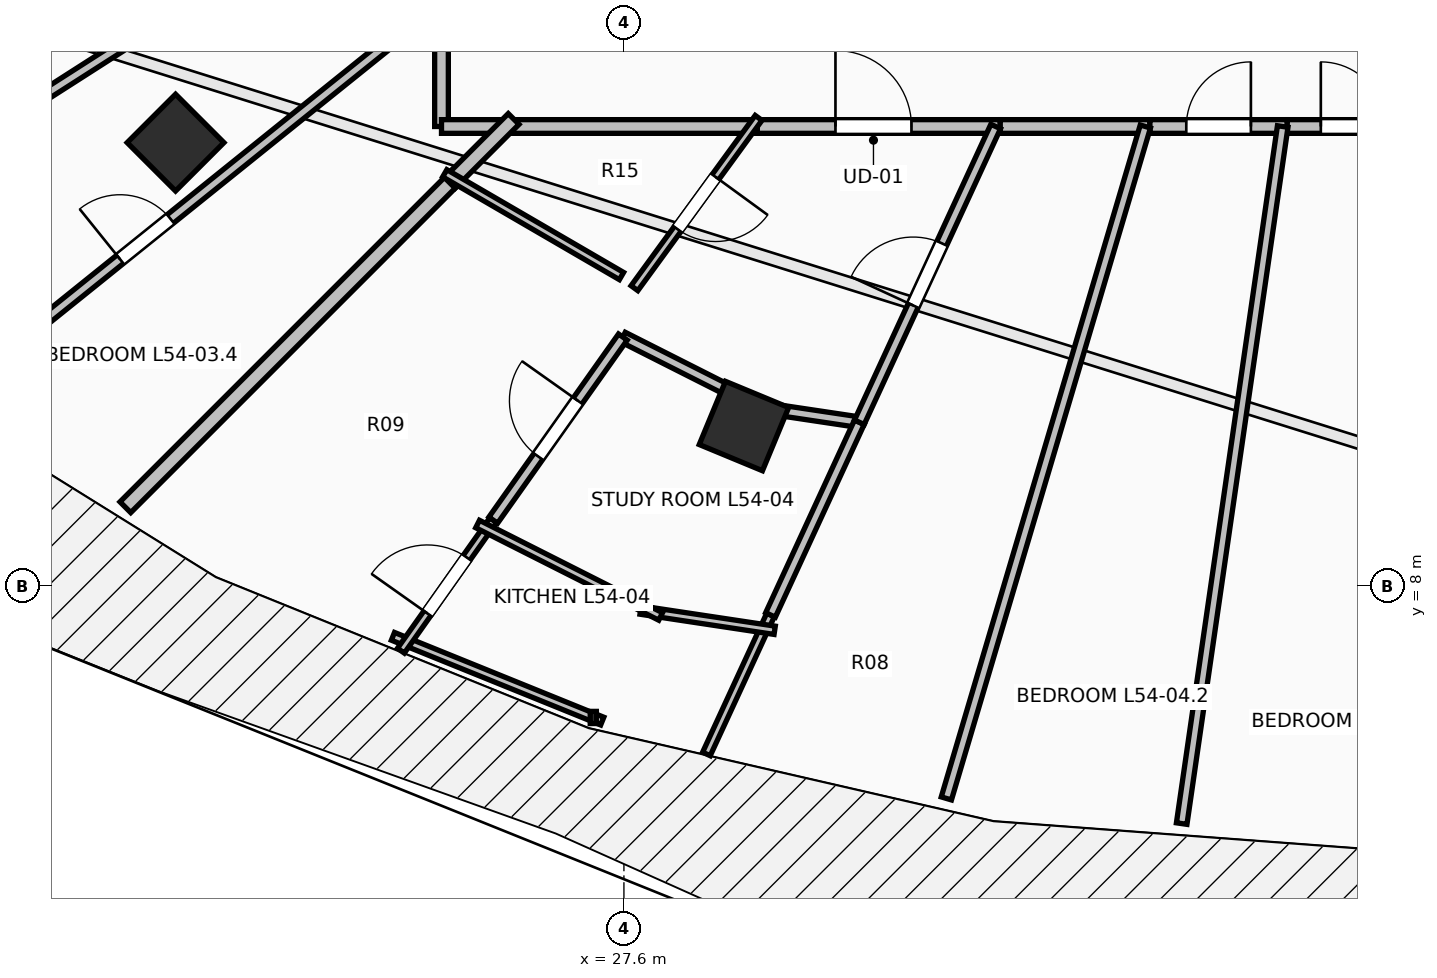
"""IFC4 building model, lengths in metres.
Left out: names, types, materials, properties, quantities, classifications, styles, units other than length and angle.
Written with IfcOpenShell. Run it as: python <this file> out.ifc"""

import sys

from ifc_helpers import new_model, si_unit, direction, frame, frame_2d, origin, origin_2d, place, context, subcontext, project, spatial, rectangle, extrude, element, fill, save


model = new_model("IFC4")
c1 = context("Model", 3, precision=1e-05, world=origin(), true_north=direction((0.0, 1.0)))
c2 = subcontext(c1, "Body", "Model", "MODEL_VIEW")
j1 = project(units=[si_unit("LENGTHUNIT", "METRE"), si_unit("PLANEANGLEUNIT", "RADIAN")], contexts=[c1])
p1 = place(None, origin())
s1 = spatial("IfcSite", under=j1, at=p1, CompositionType="ELEMENT")
p2 = place(p1, origin())
s2 = spatial("IfcBuilding", under=s1, at=p2, CompositionType="ELEMENT")
p3 = place(p2, frame((0.0, 0.0, 200.1)))
s3 = spatial("IfcBuildingStorey", under=s2, at=p3, CompositionType="ELEMENT", Elevation=200.1)
for number, where, z_axis, x_axis in (
    (1, (21.701, 13.838, 0.0), (0.0, 0.0, 1.0), (-0.707, -0.707, 0.0)),
    (2, (29.179, 10.109, 0.0), (0.0, 0.0, 1.0), (-0.383, -0.924, 0.0)),
):
    element("IfcColumn", number, at=place(p3, frame(where, z_axis=z_axis, x_axis=x_axis)), inside=s3, PredefinedType="COLUMN", context=c2, shape_type="SweptSolid", body=[
        extrude(rectangle(XDim=0.9, YDim=0.9, at=origin_2d()), origin(), (0.0, 0.0, 1.0), 3.55),
    ])
p4 = place(p3, frame((25.2, 15.627, 0.0), z_axis=(0.0, 0.0, 1.0), x_axis=(0.0, -1.0, 0.0)))
e3 = element("IfcWall", 3, at=p4, inside=s3, PredefinedType="PARTITIONING", context=c2, shape_type="SweptSolid", body=[
    extrude(rectangle(XDim=1.577, YDim=0.18, at=frame_2d((0.789, 0.0))), origin(), (0.0, 0.0, 1.0), 2.482),
])
p5 = place(p3, frame((25.2, 14.05, 0.0), z_axis=(0.0, 0.0, 1.0), x_axis=(1.0, 0.0, 0.0)))
e4 = element("IfcWall", 4, at=p5, inside=s3, PredefinedType="PARTITIONING", context=c2, shape_type="SweptSolid", body=[
    extrude(rectangle(XDim=0.91, YDim=0.18, at=frame_2d((0.455, 0.0))), origin(), (0.0, 0.0, 1.0), 3.022),
])
p6 = place(p3, frame((29.215, 14.05, 0.0), z_axis=(0.0, 0.0, 1.0), x_axis=(1.0, 0.0, 0.0)))
e5 = element("IfcWall", 5, at=p6, inside=s3, PredefinedType="PARTITIONING", context=c2, shape_type="SweptSolid", body=[
    extrude(rectangle(XDim=3.336, YDim=0.18, at=frame_2d((1.668, 0.0))), origin(), (0.0, 0.0, 1.0), 2.936),
])
p7 = place(p6, frame((1.168, 0.0, 0.0)))
e6 = element("IfcOpeningElement", 6, at=p7, cuts=e5, PredefinedType="OPENING", context=c2, shape_type="SweptSolid", body=[
    extrude(rectangle(XDim=1.0, YDim=2.15, at=frame_2d((0.5, 1.075))), frame((0.0, 0.105, 0.0), z_axis=(0.0, -1.0, 0.0), x_axis=(1.0, 0.0, 0.0)), (0.0, 0.0, 1.0), 0.21),
])
p8 = place(p3, frame((25.97, 14.05, 0.0), z_axis=(0.0, 0.0, 1.0), x_axis=(1.0, 0.0, 0.0)))
e7 = element("IfcWall", 7, at=p8, inside=s3, PredefinedType="PARTITIONING", context=c2, shape_type="SweptSolid", body=[
    extrude(rectangle(XDim=3.385, YDim=0.18, at=frame_2d((1.692, 0.0))), origin(), (0.0, 0.0, 1.0), 2.482),
])
p9 = place(p3, frame((32.551, 14.05, 0.0), z_axis=(0.0, 0.0, 1.0), x_axis=(1.0, 0.0, 0.0)))
e8 = element("IfcWall", 8, at=p9, inside=s3, PredefinedType="PARTITIONING", context=c2, shape_type="SweptSolid", body=[
    extrude(rectangle(XDim=1.969, YDim=0.18, at=frame_2d((0.984, 0.0))), origin(), (0.0, 0.0, 1.0), 2.936),
])
p10 = place(p3, frame((34.52, 14.05, 0.0), z_axis=(0.0, 0.0, 1.0), x_axis=(1.0, 0.0, 0.0)))
e9 = element("IfcWall", 9, at=p10, inside=s3, PredefinedType="PARTITIONING", context=c2, shape_type="SweptSolid", body=[
    extrude(rectangle(XDim=1.807, YDim=0.18, at=frame_2d((0.903, 0.0))), origin(), (0.0, 0.0, 1.0), 2.936),
])
p11 = place(p10, frame((0.479, 0.0, 0.0)))
e10 = element("IfcOpeningElement", 10, at=p11, cuts=e9, PredefinedType="OPENING", context=c2, shape_type="SweptSolid", body=[
    extrude(rectangle(XDim=0.85, YDim=2.1, at=frame_2d((0.425, 1.05))), frame((0.0, 0.105, 0.0), z_axis=(0.0, -1.0, 0.0), x_axis=(1.0, 0.0, 0.0)), (0.0, 0.0, 1.0), 0.21),
])
p12 = place(p3, frame((36.327, 14.05, 0.0), z_axis=(0.0, 0.0, 1.0), x_axis=(1.0, 0.0, 0.0)))
e11 = element("IfcWall", 11, at=p12, inside=s3, PredefinedType="PARTITIONING", context=c2, shape_type="SweptSolid", body=[
    extrude(rectangle(XDim=1.733, YDim=0.18, at=frame_2d((0.867, 0.0))), origin(), (0.0, 0.0, 1.0), 2.936),
])
p13 = place(p12, frame((0.441, 0.0, 0.0)))
e12 = element("IfcOpeningElement", 12, at=p13, cuts=e11, PredefinedType="OPENING", context=c2, shape_type="SweptSolid", body=[
    extrude(rectangle(XDim=0.85, YDim=2.1, at=frame_2d((0.425, 1.05))), frame((0.0, 0.105, 0.0), z_axis=(0.0, -1.0, 0.0), x_axis=(1.0, 0.0, 0.0)), (0.0, 0.0, 1.0), 0.21),
])
p14 = place(p3, frame((14.428, 14.28, 0.0), z_axis=(0.0, 0.0, 1.0), x_axis=(0.895423439435, 0.44521552546, 0.0)))
e13 = element("IfcWall", 13, at=p14, inside=s3, PredefinedType="PARTITIONING", context=c2, shape_type="SweptSolid", body=[
    extrude(rectangle(XDim=12.03, YDim=0.14, at=frame_2d((6.015, 0.0))), origin(), (0.0, 0.0, 1.0), 2.482),
])
p15 = place(p3, frame((16.555, 12.272, 0.0), z_axis=(0.0, 0.0, 1.0), x_axis=(0.842221721565, 0.539131312135, 0.0)))
e14 = element("IfcWall", 14, at=p15, inside=s3, PredefinedType="PARTITIONING", context=c2, shape_type="SweptSolid", body=[
    extrude(rectangle(XDim=10.265, YDim=0.14, at=frame_2d((5.132, 0.0))), origin(), (0.0, 0.0, 1.0), 2.482),
])
p16 = place(p3, frame((18.715, 10.487, 0.0), z_axis=(0.0, 0.0, 1.0), x_axis=(0.779157389419, 0.626828335762, 0.0)))
e15 = element("IfcWall", 15, at=p16, inside=s3, PredefinedType="PARTITIONING", context=c2, shape_type="SweptSolid", body=[
    extrude(rectangle(XDim=8.323, YDim=0.14, at=frame_2d((4.162, 0.0))), origin(), (0.0, 0.0, 1.0), 2.482),
])
p17 = place(p16, frame((2.896, 0.0, 0.0)))
e16 = element("IfcOpeningElement", 16, at=p17, cuts=e15, PredefinedType="OPENING", context=c2, shape_type="SweptSolid", body=[
    extrude(rectangle(XDim=0.85, YDim=2.1, at=frame_2d((0.425, 1.05))), frame((0.0, 0.085, 0.0), z_axis=(0.0, -1.0, 0.0), x_axis=(1.0, 0.0, 0.0)), (0.0, 0.0, 1.0), 0.17),
])
p18 = place(p3, frame((21.041, 9.041, 0.0), z_axis=(0.0, 0.0, 1.0), x_axis=(0.707106781187, 0.707106781187, 0.0)))
e17 = element("IfcWall", 17, at=p18, inside=s3, PredefinedType="PARTITIONING", context=c2, shape_type="SweptSolid", body=[
    extrude(rectangle(XDim=6.176, YDim=0.2, at=frame_2d((3.088, 0.0))), origin(), (0.0, 0.0, 1.0), 2.824),
])
p19 = place(p3, frame((25.309, 13.309, 0.0), z_axis=(0.0, 0.0, 1.0), x_axis=(0.707106781187, 0.707106781187, 0.0)))
e18 = element("IfcWall", 18, at=p19, inside=s3, PredefinedType="PARTITIONING", context=c2, shape_type="SweptSolid", body=[
    extrude(rectangle(XDim=1.188, YDim=0.2, at=frame_2d((0.594, 0.0))), origin(), (0.0, 0.0, 1.0), 3.022),
])
p20 = place(p3, frame((29.372, 14.163, 0.0), z_axis=(0.0, 0.0, 1.0), x_axis=(-0.589066743954, -0.808084383693, 0.0)))
e19 = element("IfcWall", 19, at=p20, inside=s3, PredefinedType="PARTITIONING", context=c2, shape_type="SweptSolid", body=[
    extrude(rectangle(XDim=2.772, YDim=0.11, at=frame_2d((1.386, 0.0))), origin(), (0.0, 0.0, 1.0), 2.482),
])
p21 = place(p20, frame((0.961, 0.0, 0.0)))
e20 = element("IfcOpeningElement", 20, at=p21, cuts=e19, PredefinedType="OPENING", context=c2, shape_type="SweptSolid", body=[
    extrude(rectangle(XDim=0.85, YDim=2.1, at=frame_2d((0.425, 1.05))), frame((0.0, 0.07, 0.0), z_axis=(0.0, -1.0, 0.0), x_axis=(1.0, 0.0, 0.0)), (0.0, 0.0, 1.0), 0.14),
])
p22 = place(p3, frame((27.568, 12.083, 0.0), z_axis=(0.0, 0.0, 1.0), x_axis=(-0.864515441931, 0.502606258082, 0.0)))
e21 = element("IfcWall", 21, at=p22, inside=s3, PredefinedType="PARTITIONING", context=c2, shape_type="SweptSolid", body=[
    extrude(rectangle(XDim=2.69, YDim=0.11, at=frame_2d((1.345, 0.0))), origin(), (0.0, 0.0, 1.0), 3.29),
])
p23 = place(p3, frame((29.529, 7.624, 0.0), z_axis=(0.0, 0.0, 1.0), x_axis=(-0.418673802252, -0.908136689771, 0.0)))
e22 = element("IfcWall", 22, at=p23, inside=s3, PredefinedType="PARTITIONING", context=c2, shape_type="SweptSolid", body=[
    extrude(rectangle(XDim=2.014, YDim=0.11, at=frame_2d((1.007, 0.0))), origin(), (0.0, 0.0, 1.0), 3.29),
])
p24 = place(p3, frame((24.561, 7.343, 0.0), z_axis=(0.0, 0.0, 1.0), x_axis=(0.926858319785, -0.375411314487, 0.0)))
e23 = element("IfcWall", 23, at=p24, inside=s3, PredefinedType="PARTITIONING", context=c2, shape_type="SweptSolid", body=[
    extrude(rectangle(XDim=2.971, YDim=0.11, at=frame_2d((1.485, 0.0))), origin(), (0.0, 0.0, 1.0), 3.29),
])
p25 = place(p3, frame((24.666, 7.154, 0.0), z_axis=(0.0, 0.0, 1.0), x_axis=(0.577389248155, 0.816469017241, 0.0)))
e24 = element("IfcWall", 24, at=p25, inside=s3, PredefinedType="PARTITIONING", context=c2, shape_type="SweptSolid", body=[
    extrude(rectangle(XDim=2.104, YDim=0.11, at=frame_2d((1.052, 0.0))), origin(), (0.0, 0.0, 1.0), 3.29),
])
p26 = place(p25, frame((0.602, 0.0, 0.0)))
e25 = element("IfcOpeningElement", 25, at=p26, cuts=e24, PredefinedType="OPENING", context=c2, shape_type="SweptSolid", body=[
    extrude(rectangle(XDim=0.9, YDim=2.1, at=frame_2d((0.45, 1.05))), frame((0.0, 0.07, 0.0), z_axis=(0.0, -1.0, 0.0), x_axis=(1.0, 0.0, 0.0)), (0.0, 0.0, 1.0), 0.14),
])
p27 = place(p3, frame((27.586, 11.28, 0.0), z_axis=(0.0, 0.0, 1.0), x_axis=(0.89250267167, -0.451042105643, 0.0)))
e26 = element("IfcWall", 26, at=p27, inside=s3, PredefinedType="PARTITIONING", context=c2, shape_type="SweptSolid", body=[
    extrude(rectangle(XDim=2.064, YDim=0.14, at=frame_2d((1.032, 0.0))), origin(), (0.0, 0.0, 1.0), 2.482),
])
p28 = place(p3, frame((29.428, 10.349, 0.0), z_axis=(0.0, 0.0, 1.0), x_axis=(0.988955881685, -0.148210202353, 0.0)))
e27 = element("IfcWall", 27, at=p28, inside=s3, PredefinedType="PARTITIONING", context=c2, shape_type="SweptSolid", body=[
    extrude(rectangle(XDim=1.283, YDim=0.14, at=frame_2d((0.642, 0.0))), origin(), (0.0, 0.0, 1.0), 3.29),
])
p29 = place(p3, frame((30.697, 10.159, 0.0), z_axis=(0.0, 0.0, 1.0), x_axis=(-0.41861439522, -0.908164075547, 0.0)))
e28 = element("IfcWall", 28, at=p29, inside=s3, PredefinedType="PARTITIONING", context=c2, shape_type="SweptSolid", body=[
    extrude(rectangle(XDim=2.791, YDim=0.14, at=frame_2d((1.396, 0.0))), origin(), (0.0, 0.0, 1.0), 2.824),
])
p30 = place(p3, frame((25.881, 8.871, 0.0), z_axis=(0.0, 0.0, 1.0), x_axis=(0.577734997211, 0.816224401128, 0.0)))
e29 = element("IfcWall", 29, at=p30, inside=s3, PredefinedType="PARTITIONING", context=c2, shape_type="SweptSolid", body=[
    extrude(rectangle(XDim=2.951, YDim=0.14, at=frame_2d((1.476, 0.0))), origin(), (0.0, 0.0, 1.0), 2.824),
])
p31 = place(p30, frame((1.026, 0.0, 0.0)))
e30 = element("IfcOpeningElement", 30, at=p31, cuts=e29, PredefinedType="OPENING", context=c2, shape_type="SweptSolid", body=[
    extrude(rectangle(XDim=0.9, YDim=2.1, at=frame_2d((0.45, 1.05))), frame((0.0, 0.085, 0.0), z_axis=(0.0, -1.0, 0.0), x_axis=(1.0, 0.0, 0.0)), (0.0, 0.0, 1.0), 0.17),
])
p32 = place(p3, frame((30.697, 10.159, 0.0), z_axis=(0.0, 0.0, 1.0), x_axis=(0.418635364892, 0.908154409372, 0.0)))
e31 = element("IfcWall", 31, at=p32, inside=s3, PredefinedType="PARTITIONING", context=c2, shape_type="SweptSolid", body=[
    extrude(rectangle(XDim=4.285, YDim=0.14, at=frame_2d((2.142, 0.0))), origin(), (0.0, 0.0, 1.0), 2.936),
])
p33 = place(p32, frame((1.692, 0.0, 0.0)))
e32 = element("IfcOpeningElement", 32, at=p33, cuts=e31, PredefinedType="OPENING", context=c2, shape_type="SweptSolid", body=[
    extrude(rectangle(XDim=0.9, YDim=2.1, at=frame_2d((0.45, 1.05))), frame((0.0, 0.085, 0.0), z_axis=(0.0, -1.0, 0.0), x_axis=(1.0, 0.0, 0.0)), (0.0, 0.0, 1.0), 0.17),
])
p34 = place(p3, frame((29.583, 7.422, 0.0), z_axis=(0.0, 0.0, 1.0), x_axis=(-0.988830695744, 0.149043131857, 0.0)))
e33 = element("IfcWall", 33, at=p34, inside=s3, PredefinedType="PARTITIONING", context=c2, shape_type="SweptSolid", body=[
    extrude(rectangle(XDim=1.784, YDim=0.11, at=frame_2d((0.892, 0.0))), origin(), (0.0, 0.0, 1.0), 3.29),
])
p35 = place(p3, frame((28.083, 7.604, 0.0), z_axis=(0.0, 0.0, 1.0), x_axis=(-0.892628057427, 0.450793911999, 0.0)))
e34 = element("IfcWall", 34, at=p35, inside=s3, PredefinedType="PARTITIONING", context=c2, shape_type="SweptSolid", body=[
    extrude(rectangle(XDim=2.698, YDim=0.11, at=frame_2d((1.349, 0.0))), origin(), (0.0, 0.0, 1.0), 3.29),
])
p36 = place(p3, frame((31.842, 5.21, 0.0), z_axis=(0.0, 0.0, 1.0), x_axis=(0.283952183478, 0.958838441813, 0.0)))
e35 = element("IfcWall", 35, at=p36, inside=s3, PredefinedType="PARTITIONING", context=c2, shape_type="SweptSolid", body=[
    extrude(rectangle(XDim=9.219, YDim=0.14, at=frame_2d((4.61, 0.0))), origin(), (0.0, 0.0, 1.0), 2.824),
])
p37 = place(p3, frame((34.938, 4.879, 0.0), z_axis=(0.0, 0.0, 1.0), x_axis=(0.143423836858, 0.989661357749, 0.0)))
e36 = element("IfcWall", 36, at=p37, inside=s3, PredefinedType="PARTITIONING", context=c2, shape_type="SweptSolid", body=[
    extrude(rectangle(XDim=9.267, YDim=0.14, at=frame_2d((4.633, 0.0))), origin(), (0.0, 0.0, 1.0), 2.824),
])
p38 = place(p7, origin())
e37 = element("IfcDoor", 37, at=p38, inside=s3, OperationType="SINGLE_SWING_LEFT", PredefinedType="DOOR", context=c2, shape_type="SweptSolid", body=[
    extrude(rectangle(XDim=1.0, YDim=2.15, at=frame_2d((0.5, 1.075))), frame((0.0, 0.025, 0.0), z_axis=(0.0, -1.0, 0.0), x_axis=(1.0, 0.0, 0.0)), (0.0, 0.0, 1.0), 0.05),
])
fill(e6, e37)
p39 = place(p21, origin())
e38 = element("IfcDoor", 38, at=p39, inside=s3, OperationType="SINGLE_SWING_LEFT", PredefinedType="DOOR", context=c2, shape_type="SweptSolid", body=[
    extrude(rectangle(XDim=0.85, YDim=2.1, at=frame_2d((0.425, 1.05))), frame((0.0, 0.025, 0.0), z_axis=(0.0, -1.0, 0.0), x_axis=(1.0, 0.0, 0.0)), (0.0, 0.0, 1.0), 0.05),
])
fill(e20, e38)
p40 = place(p26, origin())
e39 = element("IfcDoor", 39, at=p40, inside=s3, OperationType="SINGLE_SWING_LEFT", PredefinedType="DOOR", context=c2, shape_type="SweptSolid", body=[
    extrude(rectangle(XDim=0.9, YDim=2.1, at=frame_2d((0.45, 1.05))), frame((0.0, 0.025, 0.0), z_axis=(0.0, -1.0, 0.0), x_axis=(1.0, 0.0, 0.0)), (0.0, 0.0, 1.0), 0.05),
])
fill(e25, e39)
p41 = place(p31, origin())
e40 = element("IfcDoor", 40, at=p41, inside=s3, OperationType="SINGLE_SWING_RIGHT", PredefinedType="DOOR", context=c2, shape_type="SweptSolid", body=[
    extrude(rectangle(XDim=0.9, YDim=2.1, at=frame_2d((0.45, 1.05))), frame((0.0, 0.025, 0.0), z_axis=(0.0, -1.0, 0.0), x_axis=(1.0, 0.0, 0.0)), (0.0, 0.0, 1.0), 0.05),
])
fill(e30, e40)
p42 = place(p33, origin())
e41 = element("IfcDoor", 41, at=p42, inside=s3, OperationType="SINGLE_SWING_LEFT", PredefinedType="DOOR", context=c2, shape_type="SweptSolid", body=[
    extrude(rectangle(XDim=0.9, YDim=2.1, at=frame_2d((0.45, 1.05))), frame((0.0, 0.025, 0.0), z_axis=(0.0, -1.0, 0.0), x_axis=(1.0, 0.0, 0.0)), (0.0, 0.0, 1.0), 0.05),
])
fill(e32, e41)
p43 = place(p11, origin())
e42 = element("IfcDoor", 42, at=p43, inside=s3, OperationType="SINGLE_SWING_RIGHT", PredefinedType="DOOR", context=c2, shape_type="SweptSolid", body=[
    extrude(rectangle(XDim=0.85, YDim=2.1, at=frame_2d((0.425, 1.05))), frame((0.0, 0.025, 0.0), z_axis=(0.0, -1.0, 0.0), x_axis=(1.0, 0.0, 0.0)), (0.0, 0.0, 1.0), 0.05),
])
fill(e10, e42)
p44 = place(p13, origin())
e43 = element("IfcDoor", 43, at=p44, inside=s3, OperationType="SINGLE_SWING_LEFT", PredefinedType="DOOR", context=c2, shape_type="SweptSolid", body=[
    extrude(rectangle(XDim=0.85, YDim=2.1, at=frame_2d((0.425, 1.05))), frame((0.0, 0.025, 0.0), z_axis=(0.0, -1.0, 0.0), x_axis=(1.0, 0.0, 0.0)), (0.0, 0.0, 1.0), 0.05),
])
fill(e12, e43)
p45 = place(p17, origin())
e44 = element("IfcDoor", 44, at=p45, inside=s3, OperationType="SINGLE_SWING_LEFT", PredefinedType="DOOR", context=c2, shape_type="SweptSolid", body=[
    extrude(rectangle(XDim=0.85, YDim=2.1, at=frame_2d((0.425, 1.05))), frame((0.0, 0.025, 0.0), z_axis=(0.0, -1.0, 0.0), x_axis=(1.0, 0.0, 0.0)), (0.0, 0.0, 1.0), 0.05),
])
fill(e16, e44)
save(model, sys.argv[1])
